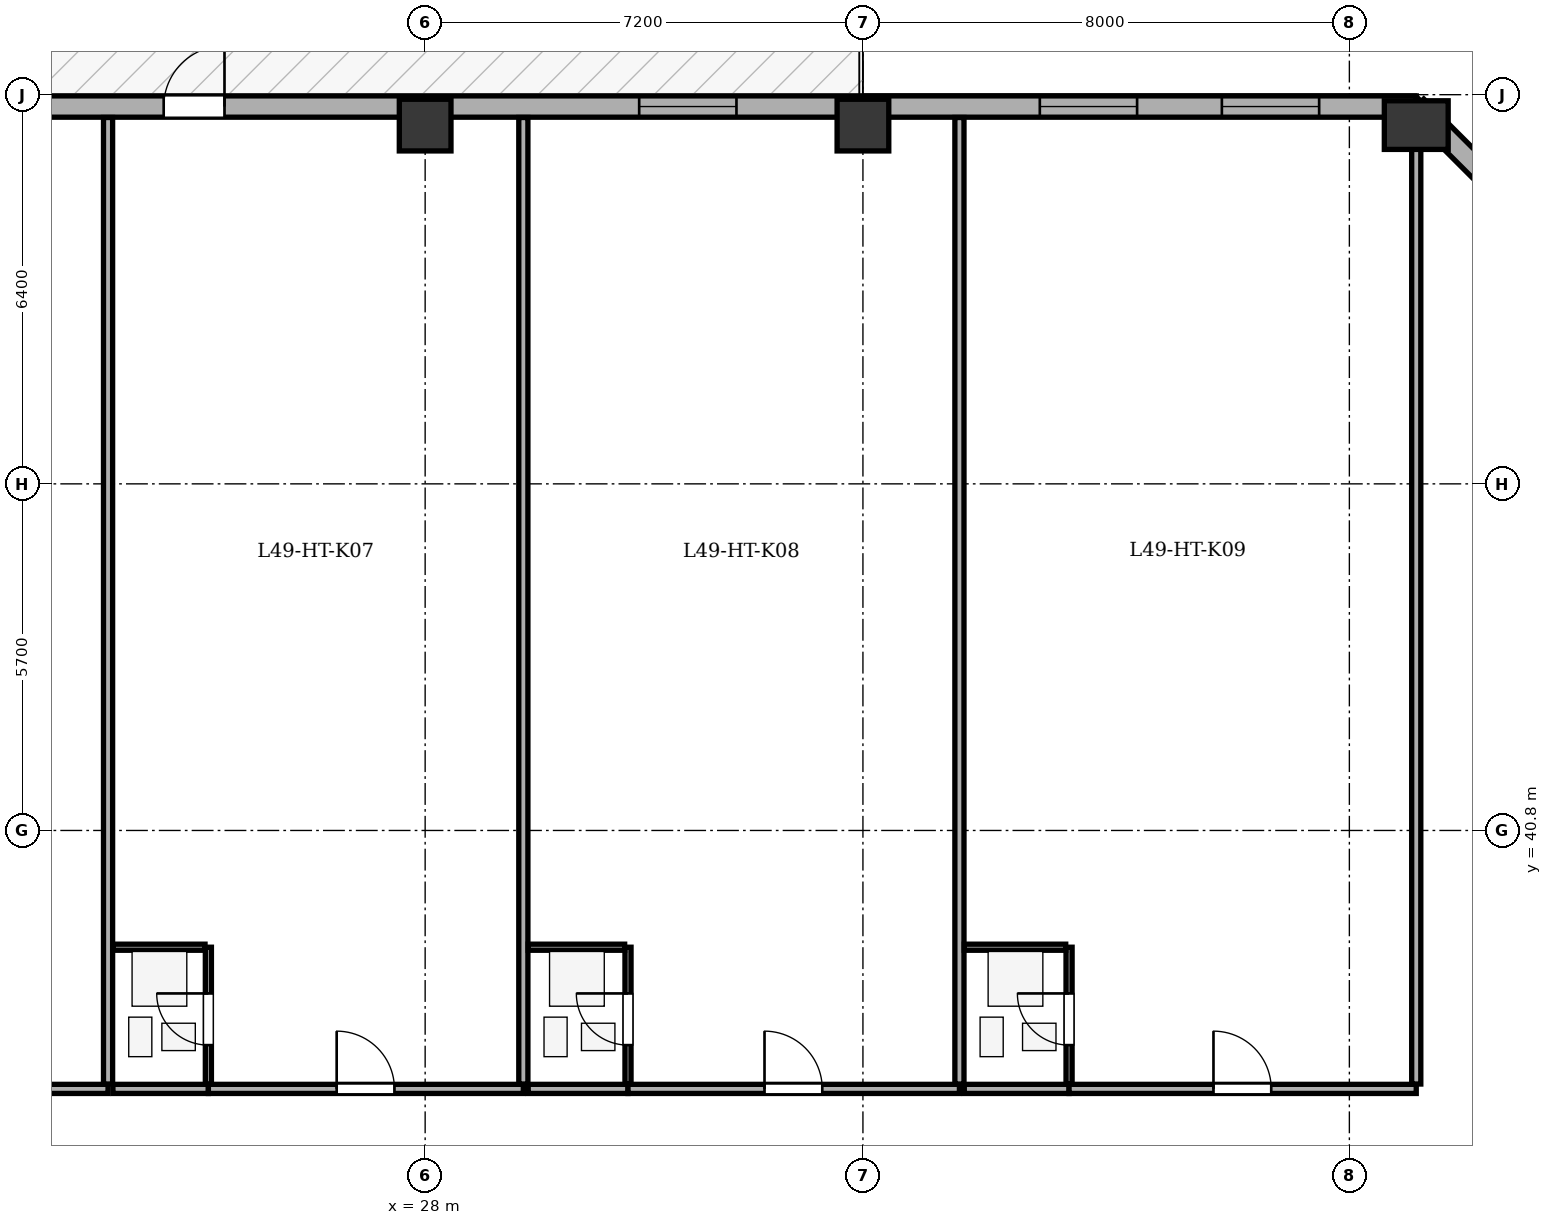
"""IFC4 building model, lengths in metres.
Left out: names, types, materials, properties, quantities, classifications, styles, units other than length and angle.
Written with IfcOpenShell. Run it as: python <this file> out.ifc"""

import sys

from ifc_helpers import new_model, si_unit, direction, frame, frame_2d, origin, origin_2d, place, context, subcontext, project, spatial, rectangle, extrude, element, fill, save


model = new_model("IFC4")
c1 = context("Model", 3, precision=1e-05, world=origin(), true_north=direction((0.0, 1.0)))
c2 = subcontext(c1, "Body", "Model", "MODEL_VIEW")
j1 = project(units=[si_unit("LENGTHUNIT", "METRE"), si_unit("PLANEANGLEUNIT", "RADIAN")], contexts=[c1])
p1 = place(None, origin())
s1 = spatial("IfcSite", under=j1, at=p1, CompositionType="ELEMENT")
p2 = place(p1, origin())
s2 = spatial("IfcBuilding", under=s1, at=p2, CompositionType="ELEMENT")
p3 = place(p2, frame((0.0, 0.0, 190.3)))
s3 = spatial("IfcBuildingStorey", under=s2, at=p3, CompositionType="ELEMENT", Elevation=190.3)
for number, where, z_axis, x_axis in (
    (1, (28.0, 52.4, 0.0), (0.0, 0.0, 1.0), (1.0, 0.0, 0.0)),
    (2, (35.2, 52.4, 0.0), (0.0, 0.0, 1.0), (1.0, 0.0, 0.0)),
):
    element("IfcColumn", number, at=place(p3, frame(where, z_axis=z_axis, x_axis=x_axis)), inside=s3, PredefinedType="COLUMN", context=c2, shape_type="SweptSolid", body=[
        extrude(rectangle(XDim=0.85, YDim=0.85, at=origin_2d()), origin(), (0.0, 0.0, 1.0), 3.5),
    ])
p4 = place(p3, frame((44.3, 52.4, 0.0), z_axis=(0.0, 0.0, 1.0), x_axis=(1.0, 0.0, 0.0)))
e3 = element("IfcColumn", 3, at=p4, inside=s3, PredefinedType="COLUMN", context=c2, shape_type="SweptSolid", body=[
    extrude(rectangle(XDim=0.8, YDim=1.05, at=origin_2d()), origin(), (0.0, 0.0, 1.0), 3.5),
])
p5 = place(p3, frame((9.3, 52.705, 0.0), z_axis=(0.0, 0.0, 1.0), x_axis=(1.0, 0.0, 0.0)))
e4 = element("IfcWall", 4, at=p5, inside=s3, PredefinedType="STANDARD", context=c2, shape_type="SweptSolid", body=[
    extrude(rectangle(XDim=35.0, YDim=0.35, at=frame_2d((17.5, 0.0))), origin(), (0.0, 0.0, 1.0), 2.785),
])
p6 = place(p5, frame((14.4, 0.0, 0.0)))
e5 = element("IfcOpeningElement", 5, at=p6, cuts=e4, PredefinedType="OPENING", context=c2, shape_type="SweptSolid", body=[
    extrude(rectangle(XDim=1.0, YDim=2.02, at=frame_2d((0.5, 1.01))), frame((0.0, 0.185, 0.0), z_axis=(0.0, -1.0, 0.0), x_axis=(1.0, 0.0, 0.0)), (0.0, 0.0, 1.0), 0.37),
])
p7 = place(p5, frame((3.123, 0.0, 0.75)))
e6 = element("IfcOpeningElement", 6, at=p7, cuts=e4, PredefinedType="OPENING", context=c2, shape_type="SweptSolid", body=[
    extrude(rectangle(XDim=1.6, YDim=1.75, at=frame_2d((0.8, 0.875))), frame((0.0, 0.185, 0.0), z_axis=(0.0, -1.0, 0.0), x_axis=(1.0, 0.0, 0.0)), (0.0, 0.0, 1.0), 0.37),
])
p8 = place(p5, frame((8.361, 0.0, 0.75)))
e7 = element("IfcOpeningElement", 7, at=p8, cuts=e4, PredefinedType="OPENING", context=c2, shape_type="SweptSolid", body=[
    extrude(rectangle(XDim=1.6, YDim=1.75, at=frame_2d((0.8, 0.875))), frame((0.0, 0.185, 0.0), z_axis=(0.0, -1.0, 0.0), x_axis=(1.0, 0.0, 0.0)), (0.0, 0.0, 1.0), 0.37),
])
p9 = place(p5, frame((22.22, 0.0, 0.75)))
e8 = element("IfcOpeningElement", 8, at=p9, cuts=e4, PredefinedType="OPENING", context=c2, shape_type="SweptSolid", body=[
    extrude(rectangle(XDim=1.6, YDim=1.75, at=frame_2d((0.8, 0.875))), frame((0.0, 0.185, 0.0), z_axis=(0.0, -1.0, 0.0), x_axis=(1.0, 0.0, 0.0)), (0.0, 0.0, 1.0), 0.37),
])
p10 = place(p5, frame((28.809, 0.0, 0.75)))
e9 = element("IfcOpeningElement", 9, at=p10, cuts=e4, PredefinedType="OPENING", context=c2, shape_type="SweptSolid", body=[
    extrude(rectangle(XDim=1.6, YDim=1.75, at=frame_2d((0.8, 0.875))), frame((0.0, 0.185, 0.0), z_axis=(0.0, -1.0, 0.0), x_axis=(1.0, 0.0, 0.0)), (0.0, 0.0, 1.0), 0.37),
])
p11 = place(p5, frame((31.803, 0.0, 0.75)))
e10 = element("IfcOpeningElement", 10, at=p11, cuts=e4, PredefinedType="OPENING", context=c2, shape_type="SweptSolid", body=[
    extrude(rectangle(XDim=1.6, YDim=1.75, at=frame_2d((0.8, 0.875))), frame((0.0, 0.185, 0.0), z_axis=(0.0, -1.0, 0.0), x_axis=(1.0, 0.0, 0.0)), (0.0, 0.0, 1.0), 0.37),
])
p12 = place(p3, frame((44.3, 52.705, 0.0), z_axis=(0.0, 0.0, 1.0), x_axis=(0.707088817216, -0.7071247447, 0.0)))
e11 = element("IfcWall", 11, at=p12, inside=s3, PredefinedType="STANDARD", context=c2, shape_type="SweptSolid", body=[
    extrude(rectangle(XDim=6.795, YDim=0.35, at=frame_2d((3.398, 0.0))), origin(), (0.0, 0.0, 1.0), 2.785),
])
p13 = place(p12, frame((2.698, 0.0, 0.75)))
e12 = element("IfcOpeningElement", 12, at=p13, cuts=e11, PredefinedType="OPENING", context=c2, shape_type="SweptSolid", body=[
    extrude(rectangle(XDim=1.4, YDim=1.65, at=frame_2d((0.7, 0.825))), frame((0.0, 0.185, 0.0), z_axis=(0.0, -1.0, 0.0), x_axis=(1.0, 0.0, 0.0)), (0.0, 0.0, 1.0), 0.37),
])
p14 = place(p3, frame((17.947, 36.55, 0.0), z_axis=(0.0, 0.0, 1.0), x_axis=(1.0, 0.0, 0.0)))
e13 = element("IfcWall", 13, at=p14, inside=s3, PredefinedType="PARTITIONING", context=c2, shape_type="SweptSolid", body=[
    extrude(rectangle(XDim=4.838, YDim=0.15, at=frame_2d((2.419, 0.0))), origin(), (0.0, 0.0, 1.0), 3.2),
])
p15 = place(p14, frame((1.939, 0.0, 0.0)))
e14 = element("IfcOpeningElement", 14, at=p15, cuts=e13, PredefinedType="OPENING", context=c2, shape_type="SweptSolid", body=[
    extrude(rectangle(XDim=0.95, YDim=2.1, at=frame_2d((0.475, 1.05))), frame((0.0, 0.085, 0.0), z_axis=(0.0, -1.0, 0.0), x_axis=(1.0, 0.0, 0.0)), (0.0, 0.0, 1.0), 0.17),
])
p16 = place(p3, frame((22.785, 36.63, 0.0), z_axis=(0.0, 0.0, 1.0), x_axis=(0.0, 1.0, 0.0)))
e15 = element("IfcWall", 15, at=p16, inside=s3, PredefinedType="PARTITIONING", context=c2, shape_type="SweptSolid", body=[
    extrude(rectangle(XDim=15.895, YDim=0.15, at=frame_2d((7.948, 0.0))), origin(), (0.0, 0.0, 1.0), 3.2),
])
p17 = place(p3, frame((22.865, 36.55, 0.0), z_axis=(0.0, 0.0, 1.0), x_axis=(1.0, 0.0, 0.0)))
e16 = element("IfcWall", 16, at=p17, inside=s3, PredefinedType="PARTITIONING", context=c2, shape_type="SweptSolid", body=[
    extrude(rectangle(XDim=1.57, YDim=0.15, at=frame_2d((0.785, 0.0))), origin(), (0.0, 0.0, 1.0), 3.2),
])
p18 = place(p3, frame((24.435, 36.55, 0.0), z_axis=(0.0, 0.0, 1.0), x_axis=(1.0, 0.0, 0.0)))
e17 = element("IfcWall", 17, at=p18, inside=s3, PredefinedType="PARTITIONING", context=c2, shape_type="SweptSolid", body=[
    extrude(rectangle(XDim=5.18, YDim=0.15, at=frame_2d((2.59, 0.0))), origin(), (0.0, 0.0, 1.0), 3.2),
])
p19 = place(p18, frame((2.11, 0.0, 0.0)))
e18 = element("IfcOpeningElement", 18, at=p19, cuts=e17, PredefinedType="OPENING", context=c2, shape_type="SweptSolid", body=[
    extrude(rectangle(XDim=0.95, YDim=2.1, at=frame_2d((0.475, 1.05))), frame((0.0, 0.085, 0.0), z_axis=(0.0, -1.0, 0.0), x_axis=(1.0, 0.0, 0.0)), (0.0, 0.0, 1.0), 0.17),
])
p20 = place(p3, frame((24.435, 36.63, 0.0), z_axis=(0.0, 0.0, 1.0), x_axis=(0.0, 1.0, 0.0)))
e19 = element("IfcWall", 19, at=p20, inside=s3, PredefinedType="PARTITIONING", context=c2, shape_type="SweptSolid", body=[
    extrude(rectangle(XDim=2.25, YDim=0.1, at=frame_2d((1.125, 0.0))), origin(), (0.0, 0.0, 1.0), 3.2),
])
p21 = place(p20, frame((0.64, 0.0, 0.0)))
e20 = element("IfcOpeningElement", 20, at=p21, cuts=e19, PredefinedType="OPENING", context=c2, shape_type="SweptSolid", body=[
    extrude(rectangle(XDim=0.85, YDim=2.05, at=frame_2d((0.425, 1.025))), frame((0.0, 0.06, 0.0), z_axis=(0.0, -1.0, 0.0), x_axis=(1.0, 0.0, 0.0)), (0.0, 0.0, 1.0), 0.12),
])
p22 = place(p3, frame((22.865, 38.88, 0.0), z_axis=(0.0, 0.0, 1.0), x_axis=(1.0, 0.0, 0.0)))
e21 = element("IfcWall", 21, at=p22, inside=s3, PredefinedType="PARTITIONING", context=c2, shape_type="SweptSolid", body=[
    extrude(rectangle(XDim=1.515, YDim=0.1, at=frame_2d((0.757, 0.0))), origin(), (0.0, 0.0, 1.0), 3.2),
])
p23 = place(p3, frame((29.615, 36.63, 0.0), z_axis=(0.0, 0.0, 1.0), x_axis=(0.0, 1.0, 0.0)))
e22 = element("IfcWall", 22, at=p23, inside=s3, PredefinedType="PARTITIONING", context=c2, shape_type="SweptSolid", body=[
    extrude(rectangle(XDim=15.895, YDim=0.15, at=frame_2d((7.948, 0.0))), origin(), (0.0, 0.0, 1.0), 2.785),
])
p24 = place(p3, frame((29.695, 36.55, 0.0), z_axis=(0.0, 0.0, 1.0), x_axis=(1.0, 0.0, 0.0)))
e23 = element("IfcWall", 23, at=p24, inside=s3, PredefinedType="PARTITIONING", context=c2, shape_type="SweptSolid", body=[
    extrude(rectangle(XDim=1.641, YDim=0.15, at=frame_2d((0.821, 0.0))), origin(), (0.0, 0.0, 1.0), 3.2),
])
p25 = place(p3, frame((31.336, 36.55, 0.0), z_axis=(0.0, 0.0, 1.0), x_axis=(1.0, 0.0, 0.0)))
e24 = element("IfcWall", 24, at=p25, inside=s3, PredefinedType="PARTITIONING", context=c2, shape_type="SweptSolid", body=[
    extrude(rectangle(XDim=5.451, YDim=0.15, at=frame_2d((2.726, 0.0))), origin(), (0.0, 0.0, 1.0), 3.2),
])
p26 = place(p25, frame((2.245, 0.0, 0.0)))
e25 = element("IfcOpeningElement", 25, at=p26, cuts=e24, PredefinedType="OPENING", context=c2, shape_type="SweptSolid", body=[
    extrude(rectangle(XDim=0.95, YDim=2.1, at=frame_2d((0.475, 1.05))), frame((0.0, 0.085, 0.0), z_axis=(0.0, -1.0, 0.0), x_axis=(1.0, 0.0, 0.0)), (0.0, 0.0, 1.0), 0.17),
])
p27 = place(p3, frame((31.336, 36.63, 0.0), z_axis=(0.0, 0.0, 1.0), x_axis=(0.0, 1.0, 0.0)))
e26 = element("IfcWall", 26, at=p27, inside=s3, PredefinedType="PARTITIONING", context=c2, shape_type="SweptSolid", body=[
    extrude(rectangle(XDim=2.25, YDim=0.1, at=frame_2d((1.125, 0.0))), origin(), (0.0, 0.0, 1.0), 3.2),
])
p28 = place(p27, frame((0.64, 0.0, 0.0)))
e27 = element("IfcOpeningElement", 27, at=p28, cuts=e26, PredefinedType="OPENING", context=c2, shape_type="SweptSolid", body=[
    extrude(rectangle(XDim=0.85, YDim=2.05, at=frame_2d((0.425, 1.025))), frame((0.0, 0.06, 0.0), z_axis=(0.0, -1.0, 0.0), x_axis=(1.0, 0.0, 0.0)), (0.0, 0.0, 1.0), 0.12),
])
p29 = place(p3, frame((29.695, 38.88, 0.0), z_axis=(0.0, 0.0, 1.0), x_axis=(1.0, 0.0, 0.0)))
e28 = element("IfcWall", 28, at=p29, inside=s3, PredefinedType="PARTITIONING", context=c2, shape_type="SweptSolid", body=[
    extrude(rectangle(XDim=1.586, YDim=0.1, at=frame_2d((0.793, 0.0))), origin(), (0.0, 0.0, 1.0), 3.2),
])
p30 = place(p3, frame((36.787, 36.63, 0.0), z_axis=(0.0, 0.0, 1.0), x_axis=(0.0, 1.0, 0.0)))
e29 = element("IfcWall", 29, at=p30, inside=s3, PredefinedType="PARTITIONING", context=c2, shape_type="SweptSolid", body=[
    extrude(rectangle(XDim=15.895, YDim=0.15, at=frame_2d((7.948, 0.0))), origin(), (0.0, 0.0, 1.0), 3.2),
])
p31 = place(p3, frame((36.867, 36.55, 0.0), z_axis=(0.0, 0.0, 1.0), x_axis=(1.0, 0.0, 0.0)))
e30 = element("IfcWall", 30, at=p31, inside=s3, PredefinedType="PARTITIONING", context=c2, shape_type="SweptSolid", body=[
    extrude(rectangle(XDim=1.723, YDim=0.15, at=frame_2d((0.862, 0.0))), origin(), (0.0, 0.0, 1.0), 3.2),
])
p32 = place(p3, frame((38.59, 36.55, 0.0), z_axis=(0.0, 0.0, 1.0), x_axis=(1.0, 0.0, 0.0)))
e31 = element("IfcWall", 31, at=p32, inside=s3, PredefinedType="PARTITIONING", context=c2, shape_type="SweptSolid", body=[
    extrude(rectangle(XDim=5.71, YDim=0.15, at=frame_2d((2.855, 0.0))), origin(), (0.0, 0.0, 1.0), 3.2),
])
p33 = place(p32, frame((2.375, 0.0, 0.0)))
e32 = element("IfcOpeningElement", 32, at=p33, cuts=e31, PredefinedType="OPENING", context=c2, shape_type="SweptSolid", body=[
    extrude(rectangle(XDim=0.95, YDim=2.1, at=frame_2d((0.475, 1.05))), frame((0.0, 0.085, 0.0), z_axis=(0.0, -1.0, 0.0), x_axis=(1.0, 0.0, 0.0)), (0.0, 0.0, 1.0), 0.17),
])
p34 = place(p3, frame((38.59, 36.63, 0.0), z_axis=(0.0, 0.0, 1.0), x_axis=(0.0, 1.0, 0.0)))
e33 = element("IfcWall", 33, at=p34, inside=s3, PredefinedType="PARTITIONING", context=c2, shape_type="SweptSolid", body=[
    extrude(rectangle(XDim=2.25, YDim=0.1, at=frame_2d((1.125, 0.0))), origin(), (0.0, 0.0, 1.0), 3.2),
])
p35 = place(p34, frame((0.64, 0.0, 0.0)))
e34 = element("IfcOpeningElement", 34, at=p35, cuts=e33, PredefinedType="OPENING", context=c2, shape_type="SweptSolid", body=[
    extrude(rectangle(XDim=0.85, YDim=2.05, at=frame_2d((0.425, 1.025))), frame((0.0, 0.06, 0.0), z_axis=(0.0, -1.0, 0.0), x_axis=(1.0, 0.0, 0.0)), (0.0, 0.0, 1.0), 0.12),
])
p36 = place(p3, frame((36.867, 38.88, 0.0), z_axis=(0.0, 0.0, 1.0), x_axis=(1.0, 0.0, 0.0)))
e35 = element("IfcWall", 35, at=p36, inside=s3, PredefinedType="PARTITIONING", context=c2, shape_type="SweptSolid", body=[
    extrude(rectangle(XDim=1.668, YDim=0.1, at=frame_2d((0.834, 0.0))), origin(), (0.0, 0.0, 1.0), 3.2),
])
p37 = place(p3, frame((44.3, 36.63, 0.0), z_axis=(0.0, 0.0, 1.0), x_axis=(0.0, 1.0, 0.0)))
e36 = element("IfcWall", 36, at=p37, inside=s3, PredefinedType="PARTITIONING", context=c2, shape_type="SweptSolid", body=[
    extrude(rectangle(XDim=15.895, YDim=0.15, at=frame_2d((7.948, 0.0))), origin(), (0.0, 0.0, 1.0), 3.2),
])
p38 = place(p6, origin())
e37 = element("IfcDoor", 37, at=p38, inside=s3, OperationType="SINGLE_SWING_RIGHT", PredefinedType="DOOR", context=c2, shape_type="SweptSolid", body=[
    extrude(rectangle(XDim=1.0, YDim=2.02, at=frame_2d((0.5, 1.01))), frame((0.0, 0.025, 0.0), z_axis=(0.0, -1.0, 0.0), x_axis=(1.0, 0.0, 0.0)), (0.0, 0.0, 1.0), 0.05),
])
fill(e5, e37)
p39 = place(p9, origin())
e38 = element("IfcWindow", 38, at=p39, inside=s3, PartitioningType="SINGLE_PANEL", PredefinedType="WINDOW", context=c2, shape_type="SweptSolid", body=[
    extrude(rectangle(XDim=1.6, YDim=1.75, at=frame_2d((0.8, 0.875))), frame((0.0, -0.01, 0.0), z_axis=(0.0, -1.0, 0.0), x_axis=(1.0, 0.0, 0.0)), (0.0, 0.0, 1.0), 0.06),
])
fill(e8, e38)
p40 = place(p10, origin())
e39 = element("IfcWindow", 39, at=p40, inside=s3, PartitioningType="SINGLE_PANEL", PredefinedType="WINDOW", context=c2, shape_type="SweptSolid", body=[
    extrude(rectangle(XDim=1.6, YDim=1.75, at=frame_2d((0.8, 0.875))), frame((0.0, -0.01, 0.0), z_axis=(0.0, -1.0, 0.0), x_axis=(1.0, 0.0, 0.0)), (0.0, 0.0, 1.0), 0.06),
])
fill(e9, e39)
p41 = place(p11, origin())
e40 = element("IfcWindow", 40, at=p41, inside=s3, PartitioningType="SINGLE_PANEL", PredefinedType="WINDOW", context=c2, shape_type="SweptSolid", body=[
    extrude(rectangle(XDim=1.6, YDim=1.75, at=frame_2d((0.8, 0.875))), frame((0.0, -0.01, 0.0), z_axis=(0.0, -1.0, 0.0), x_axis=(1.0, 0.0, 0.0)), (0.0, 0.0, 1.0), 0.06),
])
fill(e10, e40)
p42 = place(p21, origin())
e41 = element("IfcDoor", 41, at=p42, inside=s3, OperationType="SINGLE_SWING_RIGHT", PredefinedType="DOOR", context=c2, shape_type="SweptSolid", body=[
    extrude(rectangle(XDim=0.85, YDim=2.05, at=frame_2d((0.425, 1.025))), frame((0.0, 0.025, 0.0), z_axis=(0.0, -1.0, 0.0), x_axis=(1.0, 0.0, 0.0)), (0.0, 0.0, 1.0), 0.05),
])
fill(e20, e41)
p43 = place(p19, origin())
e42 = element("IfcDoor", 42, at=p43, inside=s3, OperationType="SINGLE_SWING_LEFT", PredefinedType="DOOR", context=c2, shape_type="SweptSolid", body=[
    extrude(rectangle(XDim=0.95, YDim=2.1, at=frame_2d((0.475, 1.05))), frame((0.0, 0.025, 0.0), z_axis=(0.0, -1.0, 0.0), x_axis=(1.0, 0.0, 0.0)), (0.0, 0.0, 1.0), 0.05),
])
fill(e18, e42)
p44 = place(p28, origin())
e43 = element("IfcDoor", 43, at=p44, inside=s3, OperationType="SINGLE_SWING_RIGHT", PredefinedType="DOOR", context=c2, shape_type="SweptSolid", body=[
    extrude(rectangle(XDim=0.85, YDim=2.05, at=frame_2d((0.425, 1.025))), frame((0.0, 0.025, 0.0), z_axis=(0.0, -1.0, 0.0), x_axis=(1.0, 0.0, 0.0)), (0.0, 0.0, 1.0), 0.05),
])
fill(e27, e43)
p45 = place(p26, origin())
e44 = element("IfcDoor", 44, at=p45, inside=s3, OperationType="SINGLE_SWING_LEFT", PredefinedType="DOOR", context=c2, shape_type="SweptSolid", body=[
    extrude(rectangle(XDim=0.95, YDim=2.1, at=frame_2d((0.475, 1.05))), frame((0.0, 0.025, 0.0), z_axis=(0.0, -1.0, 0.0), x_axis=(1.0, 0.0, 0.0)), (0.0, 0.0, 1.0), 0.05),
])
fill(e25, e44)
p46 = place(p35, origin())
e45 = element("IfcDoor", 45, at=p46, inside=s3, OperationType="SINGLE_SWING_RIGHT", PredefinedType="DOOR", context=c2, shape_type="SweptSolid", body=[
    extrude(rectangle(XDim=0.85, YDim=2.05, at=frame_2d((0.425, 1.025))), frame((0.0, 0.025, 0.0), z_axis=(0.0, -1.0, 0.0), x_axis=(1.0, 0.0, 0.0)), (0.0, 0.0, 1.0), 0.05),
])
fill(e34, e45)
p47 = place(p33, origin())
e46 = element("IfcDoor", 46, at=p47, inside=s3, OperationType="SINGLE_SWING_LEFT", PredefinedType="DOOR", context=c2, shape_type="SweptSolid", body=[
    extrude(rectangle(XDim=0.95, YDim=2.1, at=frame_2d((0.475, 1.05))), frame((0.0, 0.025, 0.0), z_axis=(0.0, -1.0, 0.0), x_axis=(1.0, 0.0, 0.0)), (0.0, 0.0, 1.0), 0.05),
])
fill(e32, e46)
save(model, sys.argv[1])
